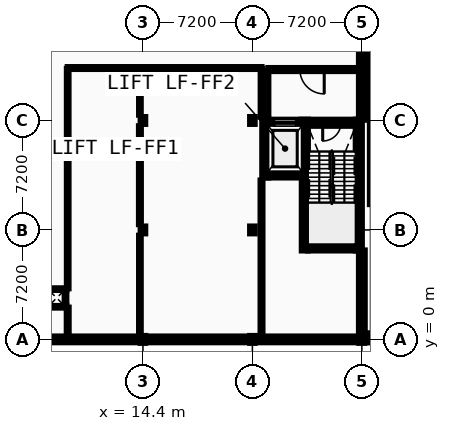
"""IFC4 building model, lengths in metres.
Left out: names, types, materials, properties, quantities, classifications, styles, units other than length and angle.
Written with IfcOpenShell. Run it as: python <this file> out.ifc"""

import sys

from ifc_helpers import new_model, si_unit, direction, frame, frame_2d, origin, origin_2d, place, context, subcontext, project, spatial, rectangle, i_section, extrude, element, fill, save


model = new_model("IFC4")
c1 = context("Model", 3, precision=1e-05, world=origin(), true_north=direction((0.0, 1.0)))
c2 = subcontext(c1, "Body", "Model", "MODEL_VIEW")
j1 = project(units=[si_unit("LENGTHUNIT", "METRE"), si_unit("PLANEANGLEUNIT", "RADIAN")], contexts=[c1])
p1 = place(None, origin())
s1 = spatial("IfcSite", under=j1, at=p1, CompositionType="ELEMENT")
p2 = place(p1, origin())
s2 = spatial("IfcBuilding", under=s1, at=p2, CompositionType="ELEMENT")
p3 = place(p2, frame((0.0, 0.0, 9.6)))
s3 = spatial("IfcBuildingStorey", under=s2, at=p3, CompositionType="ELEMENT", Elevation=9.6)
for number, where, z_axis, x_axis in (
    (1, (14.4, 0.0, 0.0), (0.0, 0.0, 1.0), (1.0, 0.0, 0.0)),
    (2, (14.4, 7.2, 0.0), (0.0, 0.0, 1.0), (1.0, 0.0, 0.0)),
    (3, (14.4, 14.4, 0.0), (0.0, 0.0, 1.0), (1.0, 0.0, 0.0)),
    (4, (21.6, 0.0, 0.0), (0.0, 0.0, 1.0), (1.0, 0.0, 0.0)),
    (5, (21.6, 7.2, 0.0), (0.0, 0.0, 1.0), (1.0, 0.0, 0.0)),
    (6, (21.6, 14.4, 0.0), (0.0, 0.0, 1.0), (1.0, 0.0, 0.0)),
    (7, (28.8, 0.0, 0.0), (0.0, 0.0, 1.0), (1.0, 0.0, 0.0)),
):
    element("IfcColumn", number, at=place(p3, frame(where, z_axis=z_axis, x_axis=x_axis)), inside=s3, PredefinedType="COLUMN", context=c2, shape_type="SweptSolid", body=[
        extrude(i_section(OverallWidth=0.3, OverallDepth=0.45, WebThickness=0.014, FlangeThickness=0.026, FilletRadius=0.027, at=origin_2d()), origin(), (0.0, 0.0, 1.0), 4.4),
    ])
for number, where, z_axis, x_axis in (
    (8, (29.52, 0.0, 0.0), (0.0, 0.0, 1.0), (1.0, 0.0, 0.0)),
    (9, (29.52, 14.4, 0.0), (0.0, 0.0, 1.0), (1.0, 0.0, 0.0)),
):
    element("IfcColumn", number, at=place(p3, frame(where, z_axis=z_axis, x_axis=x_axis)), inside=s3, PredefinedType="COLUMN", context=c2, shape_type="SweptSolid", body=[
        extrude(i_section(OverallWidth=0.3, OverallDepth=0.36, WebThickness=0.012, FlangeThickness=0.022, FilletRadius=0.027, at=origin_2d()), origin(), (0.0, 0.0, 1.0), 4.4),
    ])
p4 = place(p3, frame((7.2, 0.0, 0.0), z_axis=(0.0, 0.0, 1.0), x_axis=(1.0, 0.0, 0.0)))
e10 = element("IfcWall", 10, at=p4, inside=s3, PredefinedType="STANDARD", context=c2, shape_type="SweptSolid", body=[
    extrude(rectangle(XDim=7.2, YDim=0.38, at=frame_2d((3.6, 0.0))), origin(), (0.0, 0.0, 1.0), 3.895),
])
p5 = place(p4, frame((4.491, 0.0, 0.95)))
e11 = element("IfcOpeningElement", 11, at=p5, cuts=e10, PredefinedType="OPENING", context=c2, shape_type="SweptSolid", body=[
    extrude(rectangle(XDim=1.098, YDim=1.296, at=frame_2d((0.549, 0.648))), frame((0.0, 0.2, 0.0), z_axis=(0.0, -1.0, 0.0), x_axis=(1.0, 0.0, 0.0)), (0.0, 0.0, 1.0), 0.4),
])
p6 = place(p3, frame((14.4, 0.0, 0.0), z_axis=(0.0, 0.0, 1.0), x_axis=(1.0, 0.0, 0.0)))
e12 = element("IfcWall", 12, at=p6, inside=s3, PredefinedType="STANDARD", context=c2, shape_type="SweptSolid", body=[
    extrude(rectangle(XDim=7.2, YDim=0.38, at=frame_2d((3.6, 0.0))), origin(), (0.0, 0.0, 1.0), 3.895),
])
p7 = place(p6, frame((1.594, 0.0, 0.95)))
e13 = element("IfcOpeningElement", 13, at=p7, cuts=e12, PredefinedType="OPENING", context=c2, shape_type="SweptSolid", body=[
    extrude(rectangle(XDim=1.132, YDim=1.296, at=frame_2d((0.566, 0.648))), frame((0.0, 0.2, 0.0), z_axis=(0.0, -1.0, 0.0), x_axis=(1.0, 0.0, 0.0)), (0.0, 0.0, 1.0), 0.4),
])
p8 = place(p6, frame((4.474, 0.0, 0.95)))
e14 = element("IfcOpeningElement", 14, at=p8, cuts=e12, PredefinedType="OPENING", context=c2, shape_type="SweptSolid", body=[
    extrude(rectangle(XDim=1.132, YDim=1.296, at=frame_2d((0.566, 0.648))), frame((0.0, 0.2, 0.0), z_axis=(0.0, -1.0, 0.0), x_axis=(1.0, 0.0, 0.0)), (0.0, 0.0, 1.0), 0.4),
])
p9 = place(p3, frame((21.6, 0.0, 0.0), z_axis=(0.0, 0.0, 1.0), x_axis=(1.0, 0.0, 0.0)))
e15 = element("IfcWall", 15, at=p9, inside=s3, PredefinedType="STANDARD", context=c2, shape_type="SweptSolid", body=[
    extrude(rectangle(XDim=7.01, YDim=0.38, at=frame_2d((3.505, 0.0))), origin(), (0.0, 0.0, 1.0), 3.895),
])
p10 = place(p9, frame((4.324, 0.0, 0.95)))
e16 = element("IfcOpeningElement", 16, at=p10, cuts=e15, PredefinedType="OPENING", context=c2, shape_type="SweptSolid", body=[
    extrude(rectangle(XDim=1.166, YDim=1.296, at=frame_2d((0.583, 0.648))), frame((0.0, 0.2, 0.0), z_axis=(0.0, -1.0, 0.0), x_axis=(1.0, 0.0, 0.0)), (0.0, 0.0, 1.0), 0.4),
])
p11 = place(p3, frame((28.8, -0.19, 0.0), z_axis=(0.0, 0.0, 1.0), x_axis=(0.0, 1.0, 0.0)))
e17 = element("IfcWall", 17, at=p11, inside=s3, PredefinedType="STANDARD", context=c2, shape_type="SweptSolid", body=[
    extrude(rectangle(XDim=6.04, YDim=0.38, at=frame_2d((3.02, 0.0))), origin(), (0.0, 0.0, 1.0), 4.2),
])
p12 = place(p11, frame((2.505, 0.0, 0.95)))
e18 = element("IfcOpeningElement", 18, at=p12, cuts=e17, PredefinedType="OPENING", context=c2, shape_type="SweptSolid", body=[
    extrude(rectangle(XDim=1.03, YDim=1.332, at=frame_2d((0.515, 0.666))), frame((0.0, 0.2, 0.0), z_axis=(0.0, -1.0, 0.0), x_axis=(1.0, 0.0, 0.0)), (0.0, 0.0, 1.0), 0.4),
])
p13 = place(p3, frame((28.8, 14.45, 0.0), z_axis=(0.0, 0.0, 1.0), x_axis=(0.0, 1.0, 0.0)))
e19 = element("IfcWall", 19, at=p13, inside=s3, PredefinedType="STANDARD", context=c2, shape_type="SweptSolid", body=[
    extrude(rectangle(XDim=7.15, YDim=0.38, at=frame_2d((3.575, 0.0))), origin(), (0.0, 0.0, 1.0), 4.2),
])
p14 = place(p13, frame((1.613, 0.0, 0.95)))
e20 = element("IfcOpeningElement", 20, at=p14, cuts=e19, PredefinedType="OPENING", context=c2, shape_type="SweptSolid", body=[
    extrude(rectangle(XDim=1.064, YDim=1.332, at=frame_2d((0.532, 0.666))), frame((0.0, 0.2, 0.0), z_axis=(0.0, -1.0, 0.0), x_axis=(1.0, 0.0, 0.0)), (0.0, 0.0, 1.0), 0.4),
])
p15 = place(p13, frame((4.473, 0.0, 0.95)))
e21 = element("IfcOpeningElement", 21, at=p15, cuts=e19, PredefinedType="OPENING", context=c2, shape_type="SweptSolid", body=[
    extrude(rectangle(XDim=1.064, YDim=1.332, at=frame_2d((0.532, 0.666))), frame((0.0, 0.2, 0.0), z_axis=(0.0, -1.0, 0.0), x_axis=(1.0, 0.0, 0.0)), (0.0, 0.0, 1.0), 0.4),
])
p16 = place(p3, frame((29.52, 0.4, 0.0), z_axis=(0.0, 0.0, 1.0), x_axis=(0.0, -1.0, 0.0)))
e22 = element("IfcWall", 22, at=p16, inside=s3, PredefinedType="STANDARD", context=c2, shape_type="SweptSolid", body=[
    extrude(rectangle(XDim=0.59, YDim=0.38, at=frame_2d((0.295, 0.0))), origin(), (0.0, 0.0, 1.0), 4.2),
])
p17 = place(p3, frame((29.52, 14.4, 0.0), z_axis=(0.0, 0.0, 1.0), x_axis=(0.0, -1.0, 0.0)))
e23 = element("IfcWall", 23, at=p17, inside=s3, PredefinedType="STANDARD", context=c2, shape_type="SweptSolid", body=[
    extrude(rectangle(XDim=5.5, YDim=0.38, at=frame_2d((2.75, 0.0))), origin(), (0.0, 0.0, 1.0), 4.2),
])
p18 = place(p3, frame((29.52, 21.6, 0.0), z_axis=(0.0, 0.0, 1.0), x_axis=(0.0, -1.0, 0.0)))
e24 = element("IfcWall", 24, at=p18, inside=s3, PredefinedType="STANDARD", context=c2, shape_type="SweptSolid", body=[
    extrude(rectangle(XDim=7.2, YDim=0.38, at=frame_2d((3.6, 0.0))), origin(), (0.0, 0.0, 1.0), 3.895),
])
p19 = place(p18, frame((1.662, 0.0, 0.95)))
e25 = element("IfcOpeningElement", 25, at=p19, cuts=e24, PredefinedType="OPENING", context=c2, shape_type="SweptSolid", body=[
    extrude(rectangle(XDim=0.996, YDim=1.368, at=frame_2d((0.498, 0.684))), frame((0.0, 0.2, 0.0), z_axis=(0.0, -1.0, 0.0), x_axis=(1.0, 0.0, 0.0)), (0.0, 0.0, 1.0), 0.4),
])
p20 = place(p18, frame((4.542, 0.0, 0.95)))
e26 = element("IfcOpeningElement", 26, at=p20, cuts=e24, PredefinedType="OPENING", context=c2, shape_type="SweptSolid", body=[
    extrude(rectangle(XDim=0.996, YDim=1.368, at=frame_2d((0.498, 0.684))), frame((0.0, 0.2, 0.0), z_axis=(0.0, -1.0, 0.0), x_axis=(1.0, 0.0, 0.0)), (0.0, 0.0, 1.0), 0.4),
])
p21 = place(p3, frame((25.25, 6.05, 0.0), z_axis=(0.0, 0.0, 1.0), x_axis=(1.0, 0.0, 0.0)))
e27 = element("IfcWall", 27, at=p21, inside=s3, PredefinedType="SHEAR", context=c2, shape_type="SweptSolid", body=[
    extrude(rectangle(XDim=3.15, YDim=0.4, at=frame_2d((1.575, 0.0))), origin(), (0.0, 0.0, 1.0), 4.2),
])
p22 = place(p3, frame((25.25, 14.25, 0.0), z_axis=(0.0, 0.0, 1.0), x_axis=(1.0, 0.0, 0.0)))
e28 = element("IfcWall", 28, at=p22, inside=s3, PredefinedType="SHEAR", context=c2, shape_type="SweptSolid", body=[
    extrude(rectangle(XDim=3.15, YDim=0.4, at=frame_2d((1.575, 0.0))), origin(), (0.0, 0.0, 1.0), 4.2),
])
p23 = place(p22, frame((0.975, 0.0, 0.0)))
e29 = element("IfcOpeningElement", 29, at=p23, cuts=e28, PredefinedType="OPENING", context=c2, shape_type="SweptSolid", body=[
    extrude(rectangle(XDim=1.2, YDim=2.15, at=frame_2d((0.6, 1.075))), frame((0.0, 0.21, 0.0), z_axis=(0.0, -1.0, 0.0), x_axis=(1.0, 0.0, 0.0)), (0.0, 0.0, 1.0), 0.42),
])
for number, where, z_axis, x_axis in (
    (30, (25.05, 5.85, 0.0), (0.0, 0.0, 1.0), (0.0, 1.0, 0.0)),
    (31, (28.6, 5.85, 0.0), (0.0, 0.0, 1.0), (0.0, 1.0, 0.0)),
):
    element("IfcWall", number, at=place(p3, frame(where, z_axis=z_axis, x_axis=x_axis)), inside=s3, PredefinedType="SHEAR", context=c2, shape_type="SweptSolid", body=[
        extrude(rectangle(XDim=8.6, YDim=0.4, at=frame_2d((4.3, 0.0))), origin(), (0.0, 0.0, 1.0), 4.2),
    ])
p24 = place(p3, frame((22.65, 10.85, 0.0), z_axis=(0.0, 0.0, 1.0), x_axis=(1.0, 0.0, 0.0)))
e32 = element("IfcWall", 32, at=p24, inside=s3, PredefinedType="SHEAR", context=c2, shape_type="SweptSolid", body=[
    extrude(rectangle(XDim=2.2, YDim=0.4, at=frame_2d((1.1, 0.0))), origin(), (0.0, 0.0, 1.0), 4.2),
])
p25 = place(p3, frame((22.65, 14.25, 0.0), z_axis=(0.0, 0.0, 1.0), x_axis=(1.0, 0.0, 0.0)))
e33 = element("IfcWall", 33, at=p25, inside=s3, PredefinedType="SHEAR", context=c2, shape_type="SweptSolid", body=[
    extrude(rectangle(XDim=2.2, YDim=0.4, at=frame_2d((1.1, 0.0))), origin(), (0.0, 0.0, 1.0), 4.2),
])
p26 = place(p25, frame((0.4, 0.0, 0.0)))
e34 = element("IfcOpeningElement", 34, at=p26, cuts=e33, PredefinedType="OPENING", context=c2, shape_type="SweptSolid", body=[
    extrude(rectangle(XDim=1.4, YDim=2.2, at=frame_2d((0.7, 1.1))), frame((0.0, 0.21, 0.0), z_axis=(0.0, -1.0, 0.0), x_axis=(1.0, 0.0, 0.0)), (0.0, 0.0, 1.0), 0.42),
])
p27 = place(p3, frame((22.45, 10.65, 0.0), z_axis=(0.0, 0.0, 1.0), x_axis=(0.0, 1.0, 0.0)))
e35 = element("IfcWall", 35, at=p27, inside=s3, PredefinedType="SHEAR", context=c2, shape_type="SweptSolid", body=[
    extrude(rectangle(XDim=3.8, YDim=0.4, at=frame_2d((1.9, 0.0))), origin(), (0.0, 0.0, 1.0), 4.2),
])
p28 = place(p3, frame((22.65, 17.75, 0.0), z_axis=(0.0, 0.0, 1.0), x_axis=(1.0, 0.0, 0.0)))
e36 = element("IfcWall", 36, at=p28, inside=s3, PredefinedType="PARTITIONING", context=c2, shape_type="SweptSolid", body=[
    extrude(rectangle(XDim=5.75, YDim=0.2, at=frame_2d((2.875, 0.0))), origin(), (0.0, 0.0, 1.0), 4.2),
])
p29 = place(p28, frame((2.075, 0.0, 0.0)))
e37 = element("IfcOpeningElement", 37, at=p29, cuts=e36, PredefinedType="OPENING", context=c2, shape_type="SweptSolid", body=[
    extrude(rectangle(XDim=1.6, YDim=2.2, at=frame_2d((0.8, 1.1))), frame((0.0, 0.11, 0.0), z_axis=(0.0, -1.0, 0.0), x_axis=(1.0, 0.0, 0.0)), (0.0, 0.0, 1.0), 0.22),
])
p30 = place(p3, frame((22.55, 14.45, 0.0), z_axis=(0.0, 0.0, 1.0), x_axis=(0.0, 1.0, 0.0)))
e38 = element("IfcWall", 38, at=p30, inside=s3, PredefinedType="PARTITIONING", context=c2, shape_type="SweptSolid", body=[
    extrude(rectangle(XDim=3.2, YDim=0.2, at=frame_2d((1.6, 0.0))), origin(), (0.0, 0.0, 1.0), 4.2),
])
for number, where, z_axis, x_axis in (
    (39, (8.09, 2.145, 0.0), (0.0, 0.0, 1.0), (1.0, 0.0, 0.0)),
    (40, (8.09, 3.305, 0.0), (0.0, 0.0, 1.0), (1.0, 0.0, 0.0)),
):
    element("IfcWall", number, at=place(p3, frame(where, z_axis=z_axis, x_axis=x_axis)), inside=s3, PredefinedType="PARTITIONING", context=c2, shape_type="SweptSolid", body=[
        extrude(rectangle(XDim=1.27, YDim=0.11, at=frame_2d((0.635, 0.0))), origin(), (0.0, 0.0, 1.0), 4.2),
    ])
p31 = place(p3, frame((9.305, 2.2, 0.0), z_axis=(0.0, 0.0, 1.0), x_axis=(0.0, 1.0, 0.0)))
e41 = element("IfcWall", 41, at=p31, inside=s3, PredefinedType="PARTITIONING", context=c2, shape_type="SweptSolid", body=[
    extrude(rectangle(XDim=1.05, YDim=0.11, at=frame_2d((0.525, 0.0))), origin(), (0.0, 0.0, 1.0), 4.2),
])
p32 = place(p3, frame((9.45, 17.85, 0.0), z_axis=(0.0, 0.0, 1.0), x_axis=(1.0, 0.0, 0.0)))
e42 = element("IfcWall", 42, at=p32, inside=s3, PredefinedType="PARTITIONING", context=c2, shape_type="SweptSolid", body=[
    extrude(rectangle(XDim=12.75, YDim=0.125, at=frame_2d((6.375, 0.0))), origin(), (0.0, 0.0, 1.0), 4.2),
])
p33 = place(p32, frame((0.45, 0.0, 0.0)))
e43 = element("IfcOpeningElement", 43, at=p33, cuts=e42, PredefinedType="OPENING", context=c2, shape_type="SweptSolid", body=[
    extrude(rectangle(XDim=1.0, YDim=2.1, at=frame_2d((0.5, 1.05))), frame((0.0, 0.073, 0.0), z_axis=(0.0, -1.0, 0.0), x_axis=(1.0, 0.0, 0.0)), (0.0, 0.0, 1.0), 0.145),
])
p34 = place(p32, frame((8.3, 0.0, 0.0)))
e44 = element("IfcOpeningElement", 44, at=p34, cuts=e42, PredefinedType="OPENING", context=c2, shape_type="SweptSolid", body=[
    extrude(rectangle(XDim=0.9, YDim=2.1, at=frame_2d((0.45, 1.05))), frame((0.0, 0.073, 0.0), z_axis=(0.0, -1.0, 0.0), x_axis=(1.0, 0.0, 0.0)), (0.0, 0.0, 1.0), 0.145),
])
p35 = place(p3, frame((9.45, 0.2, 0.0), z_axis=(0.0, 0.0, 1.0), x_axis=(0.0, 1.0, 0.0)))
e45 = element("IfcWall", 45, at=p35, inside=s3, PredefinedType="PARTITIONING", context=c2, shape_type="SweptSolid", body=[
    extrude(rectangle(XDim=1.89, YDim=0.125, at=frame_2d((0.945, 0.0))), origin(), (0.0, 0.0, 1.0), 3.915),
])
p36 = place(p3, frame((9.45, 3.36, 0.0), z_axis=(0.0, 0.0, 1.0), x_axis=(0.0, 1.0, 0.0)))
e46 = element("IfcWall", 46, at=p36, inside=s3, PredefinedType="PARTITIONING", context=c2, shape_type="SweptSolid", body=[
    extrude(rectangle(XDim=14.427, YDim=0.11, at=frame_2d((7.214, 0.0))), origin(), (0.0, 0.0, 1.0), 3.915),
])
p37 = place(p3, frame((14.2, 0.38, 0.0), z_axis=(0.0, 0.0, 1.0), x_axis=(0.0, 1.0, 0.0)))
e47 = element("IfcWall", 47, at=p37, inside=s3, PredefinedType="PARTITIONING", context=c2, shape_type="SweptSolid", body=[
    extrude(rectangle(XDim=6.44, YDim=0.11, at=frame_2d((3.22, 0.0))), origin(), (0.0, 0.0, 1.0), 3.895),
])
p38 = place(p3, frame((14.2, 7.58, 0.0), z_axis=(0.0, 0.0, 1.0), x_axis=(0.0, 1.0, 0.0)))
e48 = element("IfcWall", 48, at=p38, inside=s3, PredefinedType="PARTITIONING", context=c2, shape_type="SweptSolid", body=[
    extrude(rectangle(XDim=6.44, YDim=0.125, at=frame_2d((3.22, 0.0))), origin(), (0.0, 0.0, 1.0), 3.895),
])
p39 = place(p3, frame((14.2, 14.78, 0.0), z_axis=(0.0, 0.0, 1.0), x_axis=(0.0, 1.0, 0.0)))
e49 = element("IfcWall", 49, at=p39, inside=s3, PredefinedType="PARTITIONING", context=c2, shape_type="SweptSolid", body=[
    extrude(rectangle(XDim=3.008, YDim=0.11, at=frame_2d((1.504, 0.0))), origin(), (0.0, 0.0, 1.0), 3.895),
])
p40 = place(p3, frame((22.2, 0.2, 0.0), z_axis=(0.0, 0.0, 1.0), x_axis=(0.0, 1.0, 0.0)))
e50 = element("IfcWall", 50, at=p40, inside=s3, PredefinedType="PARTITIONING", context=c2, shape_type="SweptSolid", body=[
    extrude(rectangle(XDim=10.25, YDim=0.125, at=frame_2d((5.125, 0.0))), origin(), (0.0, 0.0, 1.0), 4.2),
])
p41 = place(p3, frame((22.2, 14.65, 0.0), z_axis=(0.0, 0.0, 1.0), x_axis=(0.0, 1.0, 0.0)))
e51 = element("IfcWall", 51, at=p41, inside=s3, PredefinedType="PARTITIONING", context=c2, shape_type="SweptSolid", body=[
    extrude(rectangle(XDim=3.138, YDim=0.11, at=frame_2d((1.569, 0.0))), origin(), (0.0, 0.0, 1.0), 4.2),
])
p42 = place(p5, origin())
e52 = element("IfcWindow", 52, at=p42, inside=s3, PartitioningType="SINGLE_PANEL", PredefinedType="WINDOW", context=c2, shape_type="SweptSolid", body=[
    extrude(rectangle(XDim=1.098, YDim=1.296, at=frame_2d((0.549, 0.648))), frame((0.0, 0.03, 0.0), z_axis=(0.0, -1.0, 0.0), x_axis=(1.0, 0.0, 0.0)), (0.0, 0.0, 1.0), 0.06),
])
fill(e11, e52)
p43 = place(p7, origin())
e53 = element("IfcWindow", 53, at=p43, inside=s3, PartitioningType="SINGLE_PANEL", PredefinedType="WINDOW", context=c2, shape_type="SweptSolid", body=[
    extrude(rectangle(XDim=1.132, YDim=1.296, at=frame_2d((0.566, 0.648))), frame((0.0, 0.03, 0.0), z_axis=(0.0, -1.0, 0.0), x_axis=(1.0, 0.0, 0.0)), (0.0, 0.0, 1.0), 0.06),
])
fill(e13, e53)
p44 = place(p8, origin())
e54 = element("IfcWindow", 54, at=p44, inside=s3, PartitioningType="SINGLE_PANEL", PredefinedType="WINDOW", context=c2, shape_type="SweptSolid", body=[
    extrude(rectangle(XDim=1.132, YDim=1.296, at=frame_2d((0.566, 0.648))), frame((0.0, 0.03, 0.0), z_axis=(0.0, -1.0, 0.0), x_axis=(1.0, 0.0, 0.0)), (0.0, 0.0, 1.0), 0.06),
])
fill(e14, e54)
p45 = place(p10, origin())
e55 = element("IfcWindow", 55, at=p45, inside=s3, PartitioningType="SINGLE_PANEL", PredefinedType="WINDOW", context=c2, shape_type="SweptSolid", body=[
    extrude(rectangle(XDim=1.166, YDim=1.296, at=frame_2d((0.583, 0.648))), frame((0.0, 0.03, 0.0), z_axis=(0.0, -1.0, 0.0), x_axis=(1.0, 0.0, 0.0)), (0.0, 0.0, 1.0), 0.06),
])
fill(e16, e55)
p46 = place(p12, origin())
e56 = element("IfcWindow", 56, at=p46, inside=s3, PartitioningType="SINGLE_PANEL", PredefinedType="WINDOW", context=c2, shape_type="SweptSolid", body=[
    extrude(rectangle(XDim=1.03, YDim=1.332, at=frame_2d((0.515, 0.666))), frame((0.0, 0.03, 0.0), z_axis=(0.0, -1.0, 0.0), x_axis=(1.0, 0.0, 0.0)), (0.0, 0.0, 1.0), 0.06),
])
fill(e18, e56)
p47 = place(p14, origin())
e57 = element("IfcWindow", 57, at=p47, inside=s3, PartitioningType="SINGLE_PANEL", PredefinedType="WINDOW", context=c2, shape_type="SweptSolid", body=[
    extrude(rectangle(XDim=1.064, YDim=1.332, at=frame_2d((0.532, 0.666))), frame((0.0, 0.03, 0.0), z_axis=(0.0, -1.0, 0.0), x_axis=(1.0, 0.0, 0.0)), (0.0, 0.0, 1.0), 0.06),
])
fill(e20, e57)
p48 = place(p23, frame((1.2, 0.0, 0.0), z_axis=(0.0, 0.0, 1.0), x_axis=(-1.0, 0.0, 0.0)))
e58 = element("IfcDoor", 58, at=p48, inside=s3, OperationType="SINGLE_SWING_LEFT", PredefinedType="DOOR", context=c2, shape_type="SweptSolid", body=[
    extrude(rectangle(XDim=1.2, YDim=2.15, at=frame_2d((0.6, 1.075))), frame((0.0, 0.025, 0.0), z_axis=(0.0, -1.0, 0.0), x_axis=(1.0, 0.0, 0.0)), (0.0, 0.0, 1.0), 0.05),
])
fill(e29, e58)
p49 = place(p26, origin())
e59 = element("IfcDoor", 59, at=p49, inside=s3, OperationType="SLIDING_TO_LEFT", PredefinedType="DOOR", context=c2, shape_type="SweptSolid", body=[
    extrude(rectangle(XDim=1.4, YDim=2.2, at=frame_2d((0.7, 1.1))), frame((0.0, 0.025, 0.0), z_axis=(0.0, -1.0, 0.0), x_axis=(1.0, 0.0, 0.0)), (0.0, 0.0, 1.0), 0.05),
])
fill(e34, e59)
p50 = place(p29, origin())
e60 = element("IfcDoor", 60, at=p50, inside=s3, OperationType="DOUBLE_DOOR_SINGLE_SWING", PredefinedType="DOOR", context=c2, shape_type="SweptSolid", body=[
    extrude(rectangle(XDim=1.6, YDim=2.2, at=frame_2d((0.8, 1.1))), frame((0.0, 0.025, 0.0), z_axis=(0.0, -1.0, 0.0), x_axis=(1.0, 0.0, 0.0)), (0.0, 0.0, 1.0), 0.05),
])
fill(e37, e60)
p51 = place(p33, origin())
e61 = element("IfcDoor", 61, at=p51, inside=s3, OperationType="SLIDING_TO_LEFT", PredefinedType="DOOR", context=c2, shape_type="SweptSolid", body=[
    extrude(rectangle(XDim=1.0, YDim=2.1, at=frame_2d((0.5, 1.05))), frame((0.0, 0.025, 0.0), z_axis=(0.0, -1.0, 0.0), x_axis=(1.0, 0.0, 0.0)), (0.0, 0.0, 1.0), 0.05),
])
fill(e43, e61)
p52 = place(p34, origin())
e62 = element("IfcDoor", 62, at=p52, inside=s3, OperationType="SINGLE_SWING_RIGHT", PredefinedType="DOOR", context=c2, shape_type="SweptSolid", body=[
    extrude(rectangle(XDim=0.9, YDim=2.1, at=frame_2d((0.45, 1.05))), frame((0.0, 0.025, 0.0), z_axis=(0.0, -1.0, 0.0), x_axis=(1.0, 0.0, 0.0)), (0.0, 0.0, 1.0), 0.05),
])
fill(e44, e62)
save(model, sys.argv[1])
